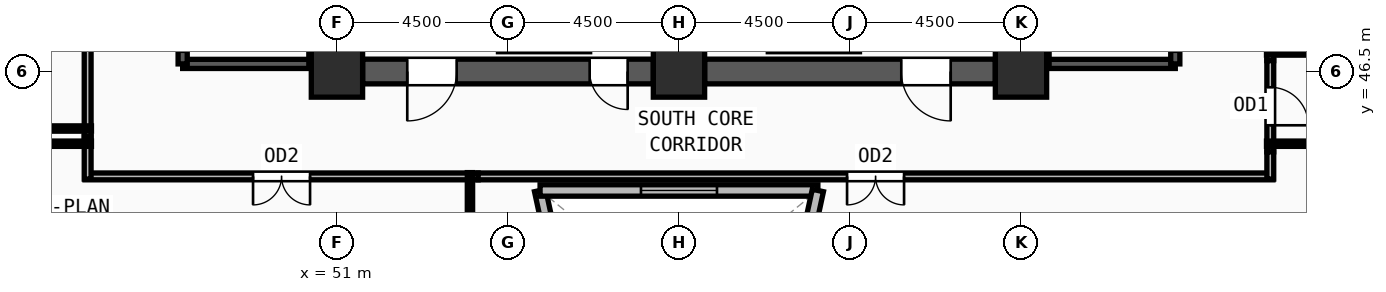
"""IFC4 building model, lengths in metres.
Left out: names, types, materials, properties, quantities, classifications, styles, units other than length and angle.
Written with IfcOpenShell. Run it as: python <this file> out.ifc"""

import sys

from ifc_helpers import new_model, si_unit, direction, frame, frame_2d, origin, origin_2d, place, context, subcontext, project, spatial, rectangle, extrude, source, transform, mapped, element, fill, save


model = new_model("IFC4")
c1 = context("Model", 3, precision=1e-05, world=origin(), true_north=direction((0.0, 1.0)))
c2 = subcontext(c1, "Body", "Model", "MODEL_VIEW")
j1 = project(units=[si_unit("LENGTHUNIT", "METRE"), si_unit("PLANEANGLEUNIT", "RADIAN")], contexts=[c1])
p1 = place(None, origin())
s1 = spatial("IfcSite", under=j1, at=p1, CompositionType="ELEMENT")
p2 = place(p1, origin())
s2 = spatial("IfcBuilding", under=s1, at=p2, CompositionType="ELEMENT")
p3 = place(p2, frame((0.0, 0.0, 247.5)))
s3 = spatial("IfcBuildingStorey", under=s2, at=p3, CompositionType="ELEMENT", Elevation=247.5)
m1 = source(origin(), c2, "Body", "SweptSolid", [
    extrude(rectangle(XDim=1.35, YDim=1.35, at=origin_2d()), origin(), (0.0, 0.0, 1.0), 3.75),
])
for number, where, z_axis, x_axis in (
    (1, (51.0, 46.5, 0.0), (0.0, 0.0, 1.0), (1.0, 0.0, 0.0)),
    (2, (60.0, 46.5, 0.0), (0.0, 0.0, 1.0), (1.0, 0.0, 0.0)),
    (3, (69.0, 46.5, 0.0), (0.0, 0.0, 1.0), (1.0, 0.0, 0.0)),
):
    element("IfcColumn", number, at=place(p3, frame(where, z_axis=z_axis, x_axis=x_axis)), inside=s3, PredefinedType="COLUMN", context=c2, shape_type="MappedRepresentation", body=[
        mapped(m1, transform((0.0, 0.0, 0.0), x_axis=(1.0, 0.0, 0.0), y_axis=(0.0, 1.0, 0.0), z_axis=(0.0, 0.0, 1.0), scale=1.0)),
    ])
p4 = place(p3, frame((38.871, 43.936, 0.0), z_axis=(0.0, 0.0, 1.0), x_axis=(0.554403141281, -0.832248254391, 0.0)))
e4 = element("IfcWall", 4, at=p4, inside=s3, PredefinedType="SOLIDWALL", context=c2, shape_type="SweptSolid", body=[
    extrude(rectangle(XDim=28.073, YDim=0.38, at=frame_2d((14.037, 0.0))), origin(), (0.0, 0.0, 1.0), 3.57),
])
m2 = source(origin(), c2, "Body", "SweptSolid", [
    extrude(rectangle(XDim=1.5, YDim=1.9, at=frame_2d((0.75, 0.95))), frame((0.0, 0.2, 0.0), z_axis=(0.0, -1.0, 0.0), x_axis=(1.0, 0.0, 0.0)), (0.0, 0.0, 1.0), 0.4),
])
p5 = place(p4, frame((6.268, 0.0, 0.55)))
e5 = element("IfcOpeningElement", 5, at=p5, cuts=e4, PredefinedType="OPENING", context=c2, shape_type="MappedRepresentation", body=[
    mapped(m2, transform((0.0, 0.0, 0.0), x_axis=(1.0, 0.0, 0.0), y_axis=(0.0, 1.0, 0.0), z_axis=(0.0, 0.0, 1.0), scale=1.0)),
])
p6 = place(p4, frame((13.287, 0.0, 0.55)))
e6 = element("IfcOpeningElement", 6, at=p6, cuts=e4, PredefinedType="OPENING", context=c2, shape_type="MappedRepresentation", body=[
    mapped(m2, transform((0.0, 0.0, 0.0), x_axis=(1.0, 0.0, 0.0), y_axis=(0.0, 1.0, 0.0), z_axis=(0.0, 0.0, 1.0), scale=1.0)),
])
p7 = place(p4, frame((20.305, 0.0, 0.55)))
e7 = element("IfcOpeningElement", 7, at=p7, cuts=e4, PredefinedType="OPENING", context=c2, shape_type="MappedRepresentation", body=[
    mapped(m2, transform((0.0, 0.0, 0.0), x_axis=(1.0, 0.0, 0.0), y_axis=(0.0, 1.0, 0.0), z_axis=(0.0, 0.0, 1.0), scale=1.0)),
])
p8 = place(p3, frame((68.325, 46.5, 0.0), z_axis=(0.0, 0.0, 1.0), x_axis=(-1.0, 0.0, 0.0)))
e8 = element("IfcWall", 8, at=p8, inside=s3, PredefinedType="SHEAR", context=c2, shape_type="SweptSolid", body=[
    extrude(rectangle(XDim=7.65, YDim=0.65, at=frame_2d((3.825, 0.0))), origin(), (0.0, 0.0, 1.0), 3.57),
])
m3 = source(origin(), c2, "Body", "SweptSolid", [
    extrude(rectangle(XDim=1.3, YDim=2.2, at=frame_2d((0.65, 1.1))), frame((0.0, 0.335, 0.0), z_axis=(0.0, -1.0, 0.0), x_axis=(1.0, 0.0, 0.0)), (0.0, 0.0, 1.0), 0.67),
])
p9 = place(p8, frame((1.175, 0.0, 0.0)))
e9 = element("IfcOpeningElement", 9, at=p9, cuts=e8, PredefinedType="OPENING", context=c2, shape_type="MappedRepresentation", body=[
    mapped(m3, transform((0.0, 0.0, 0.0), x_axis=(1.0, 0.0, 0.0), y_axis=(0.0, 1.0, 0.0), z_axis=(0.0, 0.0, 1.0), scale=1.0)),
])
p10 = place(p3, frame((59.325, 46.5, 0.0), z_axis=(0.0, 0.0, 1.0), x_axis=(-1.0, 0.0, 0.0)))
e10 = element("IfcWall", 10, at=p10, inside=s3, PredefinedType="SHEAR", context=c2, shape_type="SweptSolid", body=[
    extrude(rectangle(XDim=7.65, YDim=0.65, at=frame_2d((3.825, 0.0))), origin(), (0.0, 0.0, 1.0), 3.57),
])
p11 = place(p10, frame((5.175, 0.0, 0.0)))
e11 = element("IfcOpeningElement", 11, at=p11, cuts=e10, PredefinedType="OPENING", context=c2, shape_type="MappedRepresentation", body=[
    mapped(m3, transform((0.0, 0.0, 0.0), x_axis=(1.0, 0.0, 0.0), y_axis=(0.0, 1.0, 0.0), z_axis=(0.0, 0.0, 1.0), scale=1.0)),
])
m4 = source(origin(), c2, "Body", "SweptSolid", [
    extrude(rectangle(XDim=1.0, YDim=2.2, at=frame_2d((0.5, 1.1))), frame((0.0, 0.335, 0.0), z_axis=(0.0, -1.0, 0.0), x_axis=(1.0, 0.0, 0.0)), (0.0, 0.0, 1.0), 0.67),
])
p12 = place(p10, frame((0.675, 0.0, 0.0)))
e12 = element("IfcOpeningElement", 12, at=p12, cuts=e10, PredefinedType="OPENING", context=c2, shape_type="MappedRepresentation", body=[
    mapped(m4, transform((0.0, 0.0, 0.0), x_axis=(1.0, 0.0, 0.0), y_axis=(0.0, 1.0, 0.0), z_axis=(0.0, 0.0, 1.0), scale=1.0)),
])
p13 = place(p3, frame((46.94, 46.7, 0.0), z_axis=(0.0, 0.0, 1.0), x_axis=(1.0, 0.0, 0.0)))
e13 = element("IfcWall", 13, at=p13, inside=s3, PredefinedType="SOLIDWALL", context=c2, shape_type="SweptSolid", body=[
    extrude(rectangle(XDim=3.44, YDim=0.24, at=frame_2d((1.72, 0.0))), origin(), (0.0, 0.0, 1.0), 3.57),
])
p14 = place(p3, frame((50.38, 46.7, 0.0), z_axis=(0.0, 0.0, 1.0), x_axis=(0.0, 1.0, 0.0)))
e14 = element("IfcWall", 14, at=p14, inside=s3, PredefinedType="SOLIDWALL", context=c2, shape_type="SweptSolid", body=[
    extrude(rectangle(XDim=7.82, YDim=0.24, at=frame_2d((3.91, 0.0))), origin(), (0.0, 0.0, 1.0), 3.57),
])
p15 = place(p3, frame((46.94, 54.52, 0.0), z_axis=(0.0, 0.0, 1.0), x_axis=(0.0, -1.0, 0.0)))
e15 = element("IfcWall", 15, at=p15, inside=s3, PredefinedType="SOLIDWALL", context=c2, shape_type="SweptSolid", body=[
    extrude(rectangle(XDim=7.82, YDim=0.24, at=frame_2d((3.91, 0.0))), origin(), (0.0, 0.0, 1.0), 3.57),
])
m5 = source(origin(), c2, "Body", "SweptSolid", [
    extrude(rectangle(XDim=1.2, YDim=2.2, at=frame_2d((0.6, 1.1))), frame((0.0, 0.13, 0.0), z_axis=(0.0, -1.0, 0.0), x_axis=(1.0, 0.0, 0.0)), (0.0, 0.0, 1.0), 0.26),
])
p16 = place(p15, frame((6.3, 0.0, 0.0)))
e16 = element("IfcOpeningElement", 16, at=p16, cuts=e15, PredefinedType="OPENING", context=c2, shape_type="MappedRepresentation", body=[
    mapped(m5, transform((0.0, 0.0, 0.0), x_axis=(1.0, 0.0, 0.0), y_axis=(0.0, 1.0, 0.0), z_axis=(0.0, 0.0, 1.0), scale=1.0)),
])
p17 = place(p3, frame((69.62, 46.7, 0.0), z_axis=(0.0, 0.0, 1.0), x_axis=(1.0, 0.0, 0.0)))
e17 = element("IfcWall", 17, at=p17, inside=s3, PredefinedType="SOLIDWALL", context=c2, shape_type="SweptSolid", body=[
    extrude(rectangle(XDim=3.44, YDim=0.24, at=frame_2d((1.72, 0.0))), origin(), (0.0, 0.0, 1.0), 3.57),
])
p18 = place(p3, frame((73.06, 46.7, 0.0), z_axis=(0.0, 0.0, 1.0), x_axis=(0.0, 1.0, 0.0)))
e18 = element("IfcWall", 18, at=p18, inside=s3, PredefinedType="SOLIDWALL", context=c2, shape_type="SweptSolid", body=[
    extrude(rectangle(XDim=7.82, YDim=0.24, at=frame_2d((3.91, 0.0))), origin(), (0.0, 0.0, 1.0), 3.57),
])
p19 = place(p18, frame((0.32, 0.0, 0.0)))
e19 = element("IfcOpeningElement", 19, at=p19, cuts=e18, PredefinedType="OPENING", context=c2, shape_type="MappedRepresentation", body=[
    mapped(m5, transform((0.0, 0.0, 0.0), x_axis=(1.0, 0.0, 0.0), y_axis=(0.0, 1.0, 0.0), z_axis=(0.0, 0.0, 1.0), scale=1.0)),
])
p20 = place(p3, frame((69.62, 54.52, 0.0), z_axis=(0.0, 0.0, 1.0), x_axis=(0.0, -1.0, 0.0)))
e20 = element("IfcWall", 20, at=p20, inside=s3, PredefinedType="SOLIDWALL", context=c2, shape_type="SweptSolid", body=[
    extrude(rectangle(XDim=7.82, YDim=0.24, at=frame_2d((3.91, 0.0))), origin(), (0.0, 0.0, 1.0), 3.57),
])
p21 = place(p3, frame((57.624, 37.454, 0.0), z_axis=(0.0, 0.0, 1.0), x_axis=(-0.211319253415, 0.977417092717, 0.0)))
e21 = element("IfcWall", 21, at=p21, inside=s3, PredefinedType="SOLIDWALL", context=c2, shape_type="SweptSolid", body=[
    extrude(rectangle(XDim=6.053, YDim=0.3, at=frame_2d((3.026, 0.0))), origin(), (0.0, 0.0, 1.0), 3.57),
])
m6 = source(origin(), c2, "Body", "SweptSolid", [
    extrude(rectangle(XDim=2.0, YDim=1.9, at=frame_2d((1.0, 0.95))), frame((0.0, 0.16, 0.0), z_axis=(0.0, -1.0, 0.0), x_axis=(1.0, 0.0, 0.0)), (0.0, 0.0, 1.0), 0.32),
])
p22 = place(p21, frame((2.026, 0.0, 0.55)))
e22 = element("IfcOpeningElement", 22, at=p22, cuts=e21, PredefinedType="OPENING", context=c2, shape_type="MappedRepresentation", body=[
    mapped(m6, transform((0.0, 0.0, 0.0), x_axis=(1.0, 0.0, 0.0), y_axis=(0.0, 1.0, 0.0), z_axis=(0.0, 0.0, 1.0), scale=1.0)),
])
p23 = place(p3, frame((56.345, 43.37, 0.0), z_axis=(0.0, 0.0, 1.0), x_axis=(1.0, 0.0, 0.0)))
e23 = element("IfcWall", 23, at=p23, inside=s3, PredefinedType="SOLIDWALL", context=c2, shape_type="SweptSolid", body=[
    extrude(rectangle(XDim=7.31, YDim=0.3, at=frame_2d((3.655, 0.0))), origin(), (0.0, 0.0, 1.0), 3.57),
])
p24 = place(p23, frame((2.655, 0.0, 0.55)))
e24 = element("IfcOpeningElement", 24, at=p24, cuts=e23, PredefinedType="OPENING", context=c2, shape_type="MappedRepresentation", body=[
    mapped(m6, transform((0.0, 0.0, 0.0), x_axis=(1.0, 0.0, 0.0), y_axis=(0.0, 1.0, 0.0), z_axis=(0.0, 0.0, 1.0), scale=1.0)),
])
p25 = place(p3, frame((63.655, 43.37, 0.0), z_axis=(0.0, 0.0, 1.0), x_axis=(-0.211319253415, -0.977417092717, 0.0)))
e25 = element("IfcWall", 25, at=p25, inside=s3, PredefinedType="SOLIDWALL", context=c2, shape_type="SweptSolid", body=[
    extrude(rectangle(XDim=6.053, YDim=0.3, at=frame_2d((3.026, 0.0))), origin(), (0.0, 0.0, 1.0), 3.57),
])
p26 = place(p25, frame((2.026, 0.0, 0.55)))
e26 = element("IfcOpeningElement", 26, at=p26, cuts=e25, PredefinedType="OPENING", context=c2, shape_type="MappedRepresentation", body=[
    mapped(m6, transform((0.0, 0.0, 0.0), x_axis=(1.0, 0.0, 0.0), y_axis=(0.0, 1.0, 0.0), z_axis=(0.0, 0.0, 1.0), scale=1.0)),
])
p27 = place(p3, frame((75.56, 56.34, 0.0), z_axis=(0.0, 0.0, 1.0), x_axis=(0.0, -1.0, 0.0)))
e27 = element("IfcWall", 27, at=p27, inside=s3, PredefinedType="PARTITIONING", context=c2, shape_type="SweptSolid", body=[
    extrude(rectangle(XDim=9.555, YDim=0.18, at=frame_2d((4.778, 0.0))), origin(), (0.0, 0.0, 1.0), 3.57),
])
m7 = source(origin(), c2, "Body", "SweptSolid", [
    extrude(rectangle(XDim=1.5, YDim=2.2, at=frame_2d((0.75, 1.1))), frame((0.0, 0.1, 0.0), z_axis=(0.0, -1.0, 0.0), x_axis=(1.0, 0.0, 0.0)), (0.0, 0.0, 1.0), 0.2),
])
p28 = place(p27, frame((4.028, 0.0, 0.0)))
e28 = element("IfcOpeningElement", 28, at=p28, cuts=e27, PredefinedType="OPENING", context=c2, shape_type="MappedRepresentation", body=[
    mapped(m7, transform((0.0, 0.0, 0.0), x_axis=(1.0, 0.0, 0.0), y_axis=(0.0, 1.0, 0.0), z_axis=(0.0, 0.0, 1.0), scale=1.0)),
])
p29 = place(p3, frame((54.715, 43.74, 0.0), z_axis=(0.0, 0.0, 1.0), x_axis=(-1.0, 0.0, 0.0)))
e29 = element("IfcWall", 29, at=p29, inside=s3, PredefinedType="PARTITIONING", context=c2, shape_type="SweptSolid", body=[
    extrude(rectangle(XDim=10.345, YDim=0.18, at=frame_2d((5.172, 0.0))), origin(), (0.0, 0.0, 1.0), 3.57),
])
p30 = place(p29, frame((4.423, 0.0, 0.0)))
e30 = element("IfcOpeningElement", 30, at=p30, cuts=e29, PredefinedType="OPENING", context=c2, shape_type="MappedRepresentation", body=[
    mapped(m7, transform((0.0, 0.0, 0.0), x_axis=(1.0, 0.0, 0.0), y_axis=(0.0, 1.0, 0.0), z_axis=(0.0, 0.0, 1.0), scale=1.0)),
])
p31 = place(p3, frame((75.63, 43.74, 0.0), z_axis=(0.0, 0.0, 1.0), x_axis=(-1.0, 0.0, 0.0)))
e31 = element("IfcWall", 31, at=p31, inside=s3, PredefinedType="PARTITIONING", context=c2, shape_type="SweptSolid", body=[
    extrude(rectangle(XDim=20.915, YDim=0.18, at=frame_2d((10.458, 0.0))), origin(), (0.0, 0.0, 1.0), 3.57),
])
p32 = place(p31, frame((9.707, 0.0, 0.0)))
e32 = element("IfcOpeningElement", 32, at=p32, cuts=e31, PredefinedType="OPENING", context=c2, shape_type="MappedRepresentation", body=[
    mapped(m7, transform((0.0, 0.0, 0.0), x_axis=(1.0, 0.0, 0.0), y_axis=(0.0, 1.0, 0.0), z_axis=(0.0, 0.0, 1.0), scale=1.0)),
])
p33 = place(p3, frame((75.56, 46.785, 0.0), z_axis=(0.0, 0.0, 1.0), x_axis=(0.0, -1.0, 0.0)))
e33 = element("IfcWall", 33, at=p33, inside=s3, PredefinedType="PARTITIONING", context=c2, shape_type="SweptSolid", body=[
    extrude(rectangle(XDim=2.4, YDim=0.18, at=frame_2d((1.2, 0.0))), origin(), (0.0, 0.0, 1.0), 3.57),
])
m8 = source(origin(), c2, "Body", "SweptSolid", [
    extrude(rectangle(XDim=1.0, YDim=2.2, at=frame_2d((0.5, 1.1))), frame((0.0, 0.1, 0.0), z_axis=(0.0, -1.0, 0.0), x_axis=(1.0, 0.0, 0.0)), (0.0, 0.0, 1.0), 0.2),
])
p34 = place(p33, frame((0.7, 0.0, 0.0)))
e34 = element("IfcOpeningElement", 34, at=p34, cuts=e33, PredefinedType="OPENING", context=c2, shape_type="MappedRepresentation", body=[
    mapped(m8, transform((0.0, 0.0, 0.0), x_axis=(1.0, 0.0, 0.0), y_axis=(0.0, 1.0, 0.0), z_axis=(0.0, 0.0, 1.0), scale=1.0)),
])
p35 = place(p3, frame((44.44, 44.785, 0.0), z_axis=(0.0, 0.0, 1.0), x_axis=(0.0, 1.0, 0.0)))
e35 = element("IfcWall", 35, at=p35, inside=s3, PredefinedType="PARTITIONING", context=c2, shape_type="SweptSolid", body=[
    extrude(rectangle(XDim=3.425, YDim=0.18, at=frame_2d((1.712, 0.0))), origin(), (0.0, 0.0, 1.0), 3.57),
])
p36 = place(p3, frame((44.44, 43.67, 0.0), z_axis=(0.0, 0.0, 1.0), x_axis=(0.0, 1.0, 0.0)))
e36 = element("IfcWall", 36, at=p36, inside=s3, PredefinedType="PARTITIONING", context=c2, shape_type="SweptSolid", body=[
    extrude(rectangle(XDim=1.115, YDim=0.18, at=frame_2d((0.558, 0.0))), origin(), (0.0, 0.0, 1.0), 3.57),
])
p37 = place(p3, frame((75.56, 44.385, 0.0), z_axis=(0.0, 0.0, 1.0), x_axis=(0.0, -1.0, 0.0)))
e37 = element("IfcWall", 37, at=p37, inside=s3, PredefinedType="PARTITIONING", context=c2, shape_type="SweptSolid", body=[
    extrude(rectangle(XDim=0.715, YDim=0.18, at=frame_2d((0.357, 0.0))), origin(), (0.0, 0.0, 1.0), 3.57),
])
p38 = place(p3, frame((44.54, 44.6, 0.0), z_axis=(0.0, 0.0, 1.0), x_axis=(-1.0, 0.0, 0.0)))
e38 = element("IfcWall", 38, at=p38, inside=s3, PredefinedType="PARTITIONING", context=c2, shape_type="SweptSolid", body=[
    extrude(rectangle(XDim=6.782, YDim=0.14, at=frame_2d((3.391, 0.0))), origin(), (0.0, 0.0, 1.0), 3.57),
])
p39 = place(p3, frame((44.54, 45.0, 0.0), z_axis=(0.0, 0.0, 1.0), x_axis=(-1.0, 0.0, 0.0)))
e39 = element("IfcWall", 39, at=p39, inside=s3, PredefinedType="PARTITIONING", context=c2, shape_type="SweptSolid", body=[
    extrude(rectangle(XDim=6.973, YDim=0.14, at=frame_2d((3.487, 0.0))), origin(), (0.0, 0.0, 1.0), 3.57),
])
p40 = place(p3, frame((75.46, 44.6, 0.0), z_axis=(0.0, 0.0, 1.0), x_axis=(1.0, 0.0, 0.0)))
e40 = element("IfcWall", 40, at=p40, inside=s3, PredefinedType="PARTITIONING", context=c2, shape_type="SweptSolid", body=[
    extrude(rectangle(XDim=6.437, YDim=0.14, at=frame_2d((3.219, 0.0))), origin(), (0.0, 0.0, 1.0), 3.57),
])
p41 = place(p3, frame((75.46, 47.0, 0.0), z_axis=(0.0, 0.0, 1.0), x_axis=(1.0, 0.0, 0.0)))
e41 = element("IfcWall", 41, at=p41, inside=s3, PredefinedType="PARTITIONING", context=c2, shape_type="SweptSolid", body=[
    extrude(rectangle(XDim=7.625, YDim=0.14, at=frame_2d((3.812, 0.0))), origin(), (0.0, 0.0, 1.0), 3.57),
])
p42 = place(p3, frame((54.5, 43.84, 0.0), z_axis=(0.0, 0.0, 1.0), x_axis=(0.0, -1.0, 0.0)))
e42 = element("IfcWall", 42, at=p42, inside=s3, PredefinedType="PARTITIONING", context=c2, shape_type="SweptSolid", body=[
    extrude(rectangle(XDim=24.495, YDim=0.14, at=frame_2d((12.248, 0.0))), origin(), (0.0, 0.0, 1.0), 2.855),
])
m9 = source(origin(), c2, "Body", "SweptSolid", [
    extrude(rectangle(XDim=1.3, YDim=2.2, at=frame_2d((0.65, 1.1))), frame((0.0, 0.025, 0.0), z_axis=(0.0, -1.0, 0.0), x_axis=(1.0, 0.0, 0.0)), (0.0, 0.0, 1.0), 0.05),
])
p43 = place(p11, origin())
e43 = element("IfcDoor", 43, at=p43, inside=s3, OperationType="SINGLE_SWING_RIGHT", PredefinedType="DOOR", context=c2, shape_type="MappedRepresentation", body=[
    mapped(m9, transform((0.0, 0.0, 0.0), x_axis=(1.0, 0.0, 0.0), y_axis=(0.0, 1.0, 0.0), z_axis=(0.0, 0.0, 1.0), scale=1.0)),
])
fill(e11, e43)
m10 = source(origin(), c2, "Body", "SweptSolid", [
    extrude(rectangle(XDim=1.0, YDim=2.2, at=frame_2d((0.5, 1.1))), frame((0.0, 0.025, 0.0), z_axis=(0.0, -1.0, 0.0), x_axis=(1.0, 0.0, 0.0)), (0.0, 0.0, 1.0), 0.05),
])
p44 = place(p12, origin())
e44 = element("IfcDoor", 44, at=p44, inside=s3, OperationType="SINGLE_SWING_LEFT", PredefinedType="DOOR", context=c2, shape_type="MappedRepresentation", body=[
    mapped(m10, transform((0.0, 0.0, 0.0), x_axis=(1.0, 0.0, 0.0), y_axis=(0.0, 1.0, 0.0), z_axis=(0.0, 0.0, 1.0), scale=1.0)),
])
fill(e12, e44)
p45 = place(p9, origin())
e45 = element("IfcDoor", 45, at=p45, inside=s3, OperationType="SINGLE_SWING_LEFT", PredefinedType="DOOR", context=c2, shape_type="MappedRepresentation", body=[
    mapped(m9, transform((0.0, 0.0, 0.0), x_axis=(1.0, 0.0, 0.0), y_axis=(0.0, 1.0, 0.0), z_axis=(0.0, 0.0, 1.0), scale=1.0)),
])
fill(e9, e45)
m11 = source(origin(), c2, "Body", "SweptSolid", [
    extrude(rectangle(XDim=2.0, YDim=1.9, at=frame_2d((1.0, 0.95))), frame((0.0, 0.03, 0.0), z_axis=(0.0, -1.0, 0.0), x_axis=(1.0, 0.0, 0.0)), (0.0, 0.0, 1.0), 0.06),
])
p46 = place(p24, origin())
e46 = element("IfcWindow", 46, at=p46, inside=s3, PartitioningType="DOUBLE_PANEL_VERTICAL", PredefinedType="WINDOW", context=c2, shape_type="MappedRepresentation", body=[
    mapped(m11, transform((0.0, 0.0, 0.0), x_axis=(1.0, 0.0, 0.0), y_axis=(0.0, 1.0, 0.0), z_axis=(0.0, 0.0, 1.0), scale=1.0)),
])
fill(e24, e46)
m12 = source(origin(), c2, "Body", "SweptSolid", [
    extrude(rectangle(XDim=1.5, YDim=2.2, at=frame_2d((0.75, 1.1))), frame((0.0, 0.025, 0.0), z_axis=(0.0, -1.0, 0.0), x_axis=(1.0, 0.0, 0.0)), (0.0, 0.0, 1.0), 0.05),
])
p47 = place(p30, origin())
e47 = element("IfcDoor", 47, at=p47, inside=s3, OperationType="DOUBLE_DOOR_SINGLE_SWING", PredefinedType="DOOR", context=c2, shape_type="MappedRepresentation", body=[
    mapped(m12, transform((0.0, 0.0, 0.0), x_axis=(1.0, 0.0, 0.0), y_axis=(0.0, 1.0, 0.0), z_axis=(0.0, 0.0, 1.0), scale=1.0)),
])
fill(e30, e47)
p48 = place(p32, origin())
e48 = element("IfcDoor", 48, at=p48, inside=s3, OperationType="DOUBLE_DOOR_SINGLE_SWING", PredefinedType="DOOR", context=c2, shape_type="MappedRepresentation", body=[
    mapped(m12, transform((0.0, 0.0, 0.0), x_axis=(1.0, 0.0, 0.0), y_axis=(0.0, 1.0, 0.0), z_axis=(0.0, 0.0, 1.0), scale=1.0)),
])
fill(e32, e48)
p49 = place(p34, origin())
e49 = element("IfcDoor", 49, at=p49, inside=s3, OperationType="SINGLE_SWING_RIGHT", PredefinedType="DOOR", context=c2, shape_type="MappedRepresentation", body=[
    mapped(m10, transform((0.0, 0.0, 0.0), x_axis=(1.0, 0.0, 0.0), y_axis=(0.0, 1.0, 0.0), z_axis=(0.0, 0.0, 1.0), scale=1.0)),
])
fill(e34, e49)
save(model, sys.argv[1])
